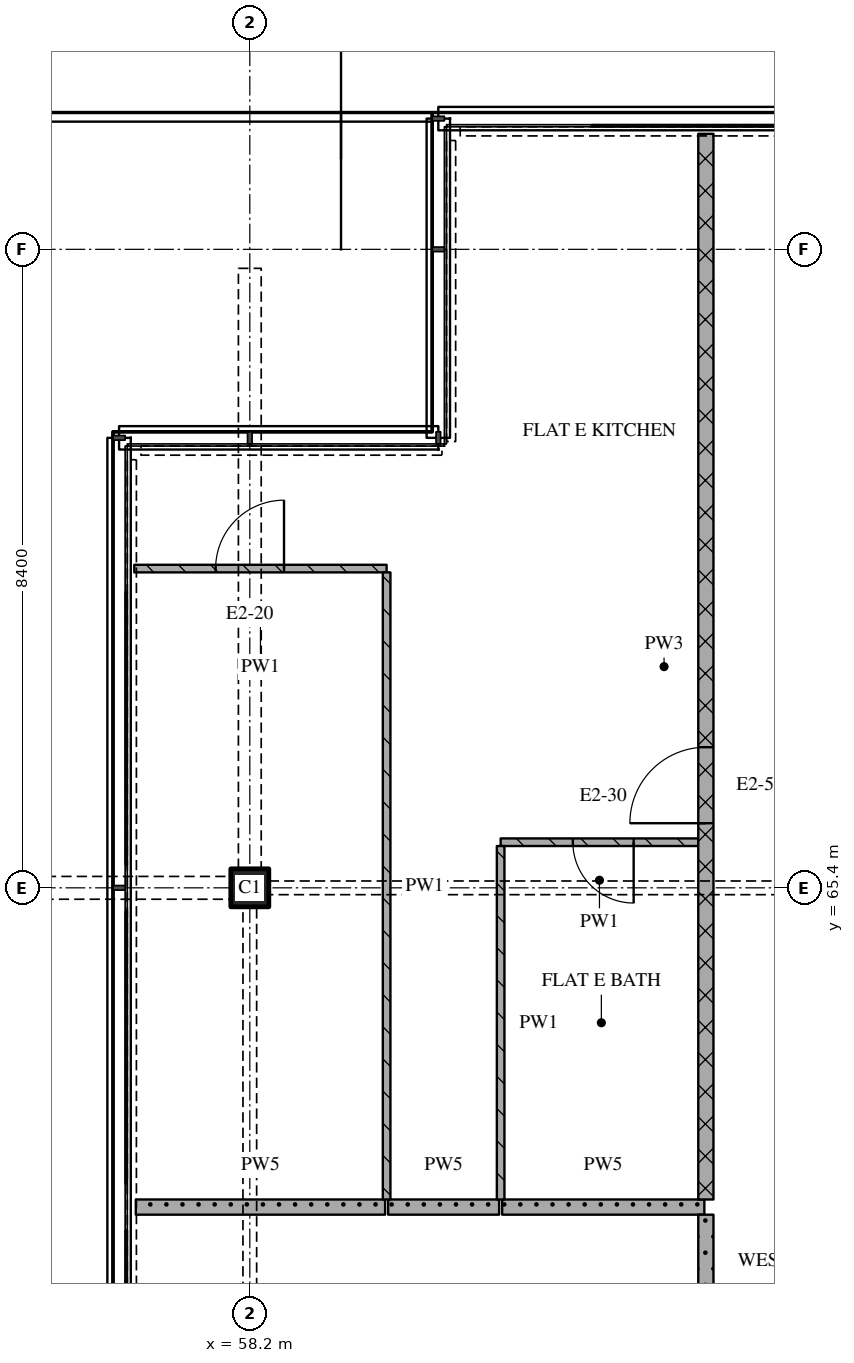
"""IFC4 building model, lengths in metres.
Left out: names, types, materials, properties, quantities, classifications, styles, units other than length and angle.
Written with IfcOpenShell. Run it as: python <this file> out.ifc"""

import sys

from ifc_helpers import new_model, si_unit, direction, frame, frame_2d, origin, origin_2d, place, context, subcontext, project, spatial, rectangle, extrude, element, fill, save


model = new_model("IFC4")
c1 = context("Model", 3, precision=1e-05, world=origin(), true_north=direction((0.0, 1.0)))
c2 = subcontext(c1, "Body", "Model", "MODEL_VIEW")
j1 = project(units=[si_unit("LENGTHUNIT", "METRE"), si_unit("PLANEANGLEUNIT", "RADIAN")], contexts=[c1])
p1 = place(None, origin())
s1 = spatial("IfcSite", under=j1, at=p1, CompositionType="ELEMENT")
p2 = place(p1, origin())
s2 = spatial("IfcBuilding", under=s1, at=p2, CompositionType="ELEMENT")
p3 = place(p2, frame((0.0, 0.0, 270.75)))
s3 = spatial("IfcBuildingStorey", under=s2, at=p3, CompositionType="ELEMENT", Elevation=270.75)
p4 = place(p3, frame((58.2, 65.4, 0.0), z_axis=(0.0, 0.0, 1.0), x_axis=(1.0, 0.0, 0.0)))
e1 = element("IfcColumn", 1, at=p4, inside=s3, PredefinedType="COLUMN", context=c2, shape_type="SweptSolid", body=[
    extrude(rectangle(XDim=0.5, YDim=0.5, at=origin_2d()), origin(), (0.0, 0.0, 1.0), 3.6),
])
p5 = place(p3, frame((56.7, 61.2, 0.0), z_axis=(0.0, 0.0, 1.0), x_axis=(1.0, 0.0, 0.0)))
e2 = element("IfcWall", 2, at=p5, inside=s3, PredefinedType="PARTITIONING", context=c2, shape_type="SweptSolid", body=[
    extrude(rectangle(XDim=3.28, YDim=0.2, at=frame_2d((1.64, 0.0))), origin(), (0.0, 0.0, 1.0), 3.32),
])
p6 = place(p3, frame((60.02, 61.2, 0.0), z_axis=(0.0, 0.0, 1.0), x_axis=(1.0, 0.0, 0.0)))
e3 = element("IfcWall", 3, at=p6, inside=s3, PredefinedType="PARTITIONING", context=c2, shape_type="SweptSolid", body=[
    extrude(rectangle(XDim=1.46, YDim=0.2, at=frame_2d((0.73, 0.0))), origin(), (0.0, 0.0, 1.0), 3.32),
])
p7 = place(p3, frame((61.52, 61.2, 0.0), z_axis=(0.0, 0.0, 1.0), x_axis=(1.0, 0.0, 0.0)))
e4 = element("IfcWall", 4, at=p7, inside=s3, PredefinedType="PARTITIONING", context=c2, shape_type="SweptSolid", body=[
    extrude(rectangle(XDim=2.66, YDim=0.2, at=frame_2d((1.33, 0.0))), origin(), (0.0, 0.0, 1.0), 3.32),
])
p8 = place(p3, frame((64.1, 66.0, 0.0), z_axis=(0.0, 0.0, 1.0), x_axis=(-1.0, 0.0, 0.0)))
e5 = element("IfcWall", 5, at=p8, inside=s3, PredefinedType="PARTITIONING", context=c2, shape_type="SweptSolid", body=[
    extrude(rectangle(XDim=2.6, YDim=0.1, at=frame_2d((1.3, 0.0))), origin(), (0.0, 0.0, 1.0), 3.32),
])
p9 = place(p8, frame((0.85, 0.0, 0.0)))
e6 = element("IfcOpeningElement", 6, at=p9, cuts=e5, PredefinedType="OPENING", context=c2, shape_type="SweptSolid", body=[
    extrude(rectangle(XDim=0.8, YDim=2.1, at=frame_2d((0.4, 1.05))), frame((0.0, 0.06, 0.0), z_axis=(0.0, -1.0, 0.0), x_axis=(1.0, 0.0, 0.0)), (0.0, 0.0, 1.0), 0.12),
])
p10 = place(p3, frame((60.0, 69.6, 0.0), z_axis=(0.0, 0.0, 1.0), x_axis=(-1.0, 0.0, 0.0)))
e7 = element("IfcWall", 7, at=p10, inside=s3, PredefinedType="PARTITIONING", context=c2, shape_type="SweptSolid", body=[
    extrude(rectangle(XDim=3.32, YDim=0.1, at=frame_2d((1.66, 0.0))), origin(), (0.0, 0.0, 1.0), 3.32),
])
p11 = place(p10, frame((1.35, 0.0, 0.0)))
e8 = element("IfcOpeningElement", 8, at=p11, cuts=e7, PredefinedType="OPENING", context=c2, shape_type="SweptSolid", body=[
    extrude(rectangle(XDim=0.9, YDim=2.1, at=frame_2d((0.45, 1.05))), frame((0.0, 0.06, 0.0), z_axis=(0.0, -1.0, 0.0), x_axis=(1.0, 0.0, 0.0)), (0.0, 0.0, 1.0), 0.12),
])
p12 = place(p3, frame((60.0, 69.55, 0.0), z_axis=(0.0, 0.0, 1.0), x_axis=(0.0, -1.0, 0.0)))
e9 = element("IfcWall", 9, at=p12, inside=s3, PredefinedType="PARTITIONING", context=c2, shape_type="SweptSolid", body=[
    extrude(rectangle(XDim=8.25, YDim=0.1, at=frame_2d((4.125, 0.0))), origin(), (0.0, 0.0, 1.0), 3.32),
])
p13 = place(p3, frame((61.5, 65.95, 0.0), z_axis=(0.0, 0.0, 1.0), x_axis=(0.0, -1.0, 0.0)))
e10 = element("IfcWall", 10, at=p13, inside=s3, PredefinedType="PARTITIONING", context=c2, shape_type="SweptSolid", body=[
    extrude(rectangle(XDim=4.65, YDim=0.1, at=frame_2d((2.325, 0.0))), origin(), (0.0, 0.0, 1.0), 3.32),
])
p14 = place(p3, frame((64.2, 61.3, 0.0), z_axis=(0.0, 0.0, 1.0), x_axis=(0.0, 1.0, 0.0)))
e11 = element("IfcWall", 11, at=p14, inside=s3, PredefinedType="PARTITIONING", context=c2, shape_type="SweptSolid", body=[
    extrude(rectangle(XDim=14.02, YDim=0.2, at=frame_2d((7.01, 0.0))), origin(), (0.0, 0.0, 1.0), 3.32),
])
p15 = place(p14, frame((4.95, 0.0, 0.0)))
e12 = element("IfcOpeningElement", 12, at=p15, cuts=e11, PredefinedType="OPENING", context=c2, shape_type="SweptSolid", body=[
    extrude(rectangle(XDim=1.0, YDim=2.1, at=frame_2d((0.5, 1.05))), frame((0.0, 0.11, 0.0), z_axis=(0.0, -1.0, 0.0), x_axis=(1.0, 0.0, 0.0)), (0.0, 0.0, 1.0), 0.22),
])
p16 = place(p3, frame((64.2, 61.1, 0.0), z_axis=(0.0, 0.0, 1.0), x_axis=(0.0, -1.0, 0.0)))
e13 = element("IfcWall", 13, at=p16, inside=s3, PredefinedType="PARTITIONING", context=c2, shape_type="SweptSolid", body=[
    extrude(rectangle(XDim=2.2, YDim=0.2, at=frame_2d((1.1, 0.0))), origin(), (0.0, 0.0, 1.0), 3.32),
])
p17 = place(p9, origin())
e14 = element("IfcDoor", 14, at=p17, inside=s3, OperationType="SINGLE_SWING_LEFT", PredefinedType="DOOR", context=c2, shape_type="SweptSolid", body=[
    extrude(rectangle(XDim=0.8, YDim=2.1, at=frame_2d((0.4, 1.05))), frame((0.0, 0.025, 0.0), z_axis=(0.0, -1.0, 0.0), x_axis=(1.0, 0.0, 0.0)), (0.0, 0.0, 1.0), 0.05),
])
fill(e6, e14)
p18 = place(p11, origin())
e15 = element("IfcDoor", 15, at=p18, inside=s3, OperationType="SINGLE_SWING_RIGHT", PredefinedType="DOOR", context=c2, shape_type="SweptSolid", body=[
    extrude(rectangle(XDim=0.9, YDim=2.1, at=frame_2d((0.45, 1.05))), frame((0.0, 0.025, 0.0), z_axis=(0.0, -1.0, 0.0), x_axis=(1.0, 0.0, 0.0)), (0.0, 0.0, 1.0), 0.05),
])
fill(e8, e15)
p19 = place(p15, origin())
e16 = element("IfcDoor", 16, at=p19, inside=s3, OperationType="SINGLE_SWING_LEFT", PredefinedType="DOOR", context=c2, shape_type="SweptSolid", body=[
    extrude(rectangle(XDim=1.0, YDim=2.1, at=frame_2d((0.5, 1.05))), frame((0.0, 0.025, 0.0), z_axis=(0.0, -1.0, 0.0), x_axis=(1.0, 0.0, 0.0)), (0.0, 0.0, 1.0), 0.05),
])
fill(e12, e16)
save(model, sys.argv[1])
